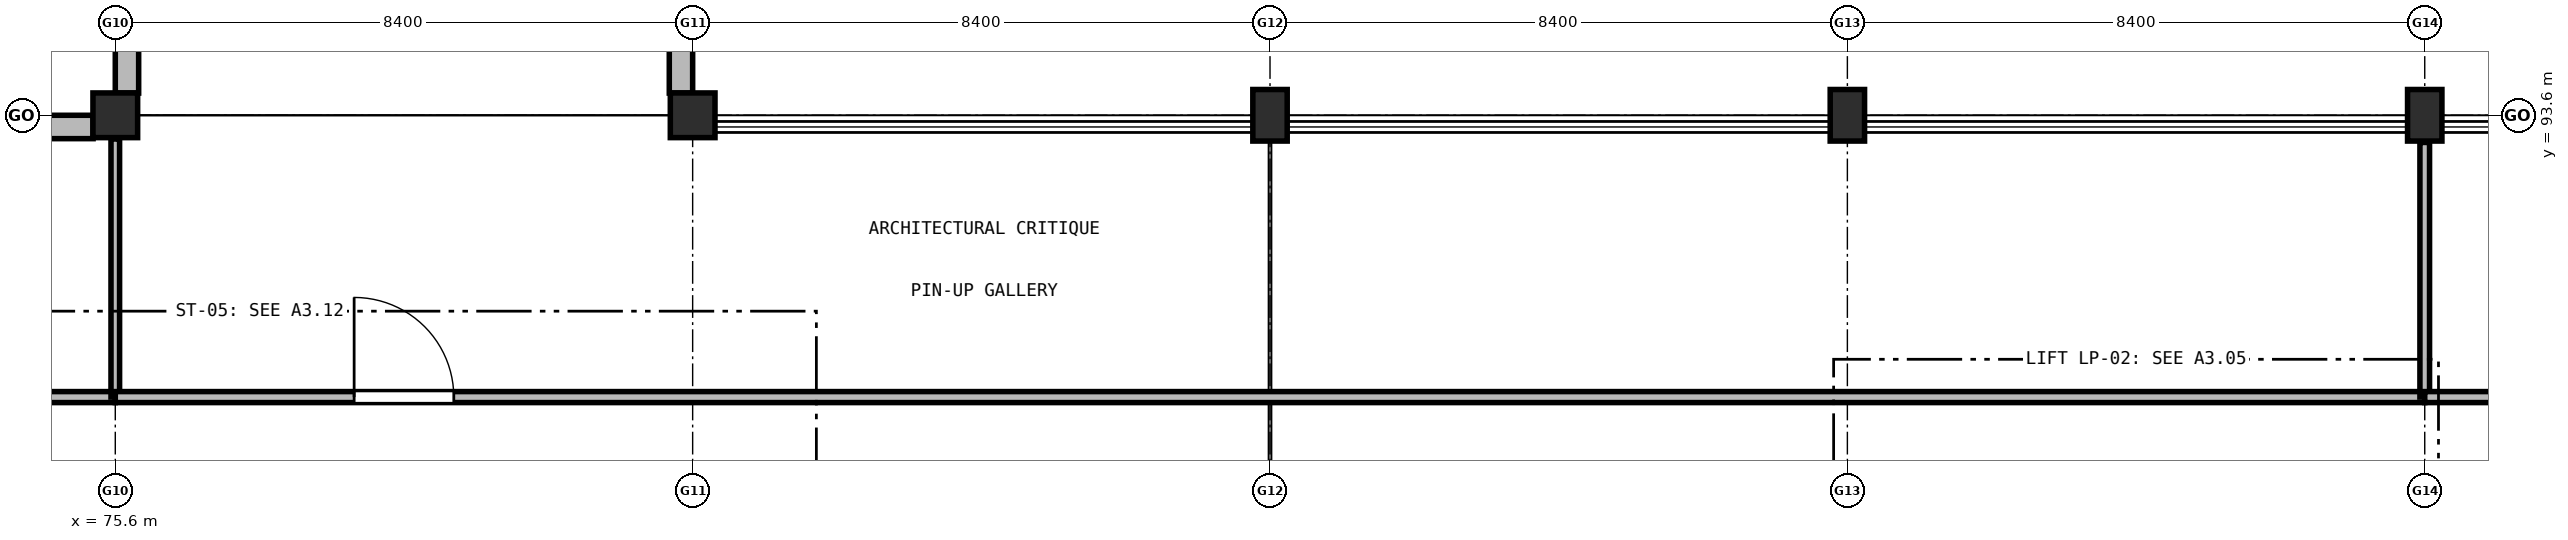
"""IFC4 building model, lengths in metres.
Left out: names, types, materials, properties, quantities, classifications, styles, units other than length and angle.
Written with IfcOpenShell. Run it as: python <this file> out.ifc"""

import sys

from ifc_helpers import new_model, si_unit, direction, frame, frame_2d, origin, origin_2d, place, context, subcontext, project, spatial, rectangle, extrude, element, fill, save


model = new_model("IFC4")
c1 = context("Model", 3, precision=1e-05, world=origin(), true_north=direction((0.0, 1.0)))
c2 = subcontext(c1, "Body", "Model", "MODEL_VIEW")
j1 = project(units=[si_unit("LENGTHUNIT", "METRE"), si_unit("PLANEANGLEUNIT", "RADIAN")], contexts=[c1])
p1 = place(None, origin())
s1 = spatial("IfcSite", under=j1, at=p1, CompositionType="ELEMENT")
p2 = place(p1, origin())
s2 = spatial("IfcBuilding", under=s1, at=p2, CompositionType="ELEMENT")
p3 = place(p2, frame((0.0, 0.0, 5.1)))
s3 = spatial("IfcBuildingStorey", under=s2, at=p3, CompositionType="ELEMENT", Elevation=5.1)
for number, where, z_axis, x_axis in (
    (1, (75.6, 93.6, 0.0), (0.0, 0.0, 1.0), (1.0, 0.0, 0.0)),
    (2, (84.0, 93.6, 0.0), (0.0, 0.0, 1.0), (1.0, 0.0, 0.0)),
):
    element("IfcColumn", number, at=place(p3, frame(where, z_axis=z_axis, x_axis=x_axis)), inside=s3, PredefinedType="COLUMN", context=c2, shape_type="SweptSolid", body=[
        extrude(rectangle(XDim=0.65, YDim=0.65, at=origin_2d()), origin(), (0.0, 0.0, 1.0), 4.2),
    ])
for number, where, z_axis, x_axis in (
    (3, (92.4, 93.6, 0.0), (0.0, 0.0, 1.0), (1.0, 0.0, 0.0)),
    (4, (100.8, 93.6, 0.0), (0.0, 0.0, 1.0), (1.0, 0.0, 0.0)),
    (5, (109.2, 93.6, 0.0), (0.0, 0.0, 1.0), (1.0, 0.0, 0.0)),
):
    element("IfcColumn", number, at=place(p3, frame(where, z_axis=z_axis, x_axis=x_axis)), inside=s3, PredefinedType="COLUMN", context=c2, shape_type="SweptSolid", body=[
        extrude(rectangle(XDim=0.5, YDim=0.75, at=origin_2d()), origin(), (0.0, 0.0, 1.0), 4.2),
    ])
p4 = place(p3, frame((67.523, 93.43, 0.0), z_axis=(0.0, 0.0, 1.0), x_axis=(1.0, 0.0, 0.0)))
e6 = element("IfcWall", 6, at=p4, inside=s3, PredefinedType="SOLIDWALL", context=c2, shape_type="SweptSolid", body=[
    extrude(rectangle(XDim=7.754, YDim=0.34, at=frame_2d((3.877, 0.0))), origin(), (0.0, 0.0, 1.0), 3.11),
])
p5 = place(p4, frame((2.327, 0.0, 0.95)))
e7 = element("IfcOpeningElement", 7, at=p5, cuts=e6, PredefinedType="OPENING", context=c2, shape_type="SweptSolid", body=[
    extrude(rectangle(XDim=3.1, YDim=1.91, at=frame_2d((1.55, 0.955))), frame((0.0, 0.18, 0.0), z_axis=(0.0, -1.0, 0.0), x_axis=(1.0, 0.0, 0.0)), (0.0, 0.0, 1.0), 0.36),
])
p6 = place(p3, frame((75.77, 93.923, 0.0), z_axis=(0.0, 0.0, 1.0), x_axis=(0.0, 1.0, 0.0)))
e8 = element("IfcWall", 8, at=p6, inside=s3, PredefinedType="SOLIDWALL", context=c2, shape_type="SweptSolid", body=[
    extrude(rectangle(XDim=6.504, YDim=0.34, at=frame_2d((3.252, 0.0))), origin(), (0.0, 0.0, 1.0), 3.86),
])
p7 = place(p6, frame((1.602, 0.0, 0.95)))
e9 = element("IfcOpeningElement", 9, at=p7, cuts=e8, PredefinedType="OPENING", context=c2, shape_type="SweptSolid", body=[
    extrude(rectangle(XDim=3.3, YDim=1.65, at=frame_2d((1.65, 0.825))), frame((0.0, 0.18, 0.0), z_axis=(0.0, -1.0, 0.0), x_axis=(1.0, 0.0, 0.0)), (0.0, 0.0, 1.0), 0.36),
])
p8 = place(p3, frame((83.83, 100.427, 0.0), z_axis=(0.0, 0.0, 1.0), x_axis=(0.0, -1.0, 0.0)))
e10 = element("IfcWall", 10, at=p8, inside=s3, PredefinedType="SOLIDWALL", context=c2, shape_type="SweptSolid", body=[
    extrude(rectangle(XDim=6.504, YDim=0.34, at=frame_2d((3.252, 0.0))), origin(), (0.0, 0.0, 1.0), 3.86),
])
p9 = place(p8, frame((2.402, 0.0, 0.95)))
e11 = element("IfcOpeningElement", 11, at=p9, cuts=e10, PredefinedType="OPENING", context=c2, shape_type="SweptSolid", body=[
    extrude(rectangle(XDim=1.7, YDim=1.65, at=frame_2d((0.85, 0.825))), frame((0.0, 0.18, 0.0), z_axis=(0.0, -1.0, 0.0), x_axis=(1.0, 0.0, 0.0)), (0.0, 0.0, 1.0), 0.36),
])
p10 = place(p3, frame((42.0, 89.5, 0.0), z_axis=(0.0, 0.0, 1.0), x_axis=(1.0, 0.0, 0.0)))
e12 = element("IfcWall", 12, at=p10, inside=s3, PredefinedType="PARTITIONING", context=c2, shape_type="SweptSolid", body=[
    extrude(rectangle(XDim=33.6, YDim=0.16, at=frame_2d((16.8, 0.0))), origin(), (0.0, 0.0, 1.0), 3.305),
])
p11 = place(p10, frame((3.7, 0.0, 0.0)))
e13 = element("IfcOpeningElement", 13, at=p11, cuts=e12, PredefinedType="OPENING", context=c2, shape_type="SweptSolid", body=[
    extrude(rectangle(XDim=1.0, YDim=2.1, at=frame_2d((0.5, 1.05))), frame((0.0, 0.09, 0.0), z_axis=(0.0, -1.0, 0.0), x_axis=(1.0, 0.0, 0.0)), (0.0, 0.0, 1.0), 0.18),
])
p12 = place(p3, frame((75.6, 89.5, 0.0), z_axis=(0.0, 0.0, 1.0), x_axis=(0.0, 1.0, 0.0)))
e14 = element("IfcWall", 14, at=p12, inside=s3, PredefinedType="PARTITIONING", context=c2, shape_type="SweptSolid", body=[
    extrude(rectangle(XDim=3.755, YDim=0.125, at=frame_2d((1.877, 0.0))), origin(), (0.0, 0.0, 1.0), 3.105),
])
p13 = place(p3, frame((75.6, 89.5, 0.0), z_axis=(0.0, 0.0, 1.0), x_axis=(1.0, 0.0, 0.0)))
e15 = element("IfcWall", 15, at=p13, inside=s3, PredefinedType="PARTITIONING", context=c2, shape_type="SweptSolid", body=[
    extrude(rectangle(XDim=33.6, YDim=0.16, at=frame_2d((16.8, 0.0))), origin(), (0.0, 0.0, 1.0), 3.305),
])
p14 = place(p13, frame((3.475, 0.0, 0.0)))
e16 = element("IfcOpeningElement", 16, at=p14, cuts=e15, PredefinedType="OPENING", context=c2, shape_type="SweptSolid", body=[
    extrude(rectangle(XDim=1.45, YDim=2.2, at=frame_2d((0.725, 1.1))), frame((0.0, 0.09, 0.0), z_axis=(0.0, -1.0, 0.0), x_axis=(1.0, 0.0, 0.0)), (0.0, 0.0, 1.0), 0.18),
])
p15 = place(p3, frame((109.2, 89.5, 0.0), z_axis=(0.0, 0.0, 1.0), x_axis=(0.0, 1.0, 0.0)))
e17 = element("IfcWall", 17, at=p15, inside=s3, PredefinedType="PARTITIONING", context=c2, shape_type="SweptSolid", body=[
    extrude(rectangle(XDim=3.705, YDim=0.14, at=frame_2d((1.853, 0.0))), origin(), (0.0, 0.0, 1.0), 3.105),
])
p16 = place(p3, frame((109.2, 89.5, 0.0), z_axis=(0.0, 0.0, 1.0), x_axis=(1.0, 0.0, 0.0)))
e18 = element("IfcWall", 18, at=p16, inside=s3, PredefinedType="PARTITIONING", context=c2, shape_type="SweptSolid", body=[
    extrude(rectangle(XDim=24.98, YDim=0.16, at=frame_2d((12.49, 0.0))), origin(), (0.0, 0.0, 1.0), 3.305),
])
p17 = place(p16, frame((3.425, 0.0, 0.0)))
e19 = element("IfcOpeningElement", 19, at=p17, cuts=e18, PredefinedType="OPENING", context=c2, shape_type="SweptSolid", body=[
    extrude(rectangle(XDim=1.55, YDim=2.2, at=frame_2d((0.775, 1.1))), frame((0.0, 0.09, 0.0), z_axis=(0.0, -1.0, 0.0), x_axis=(1.0, 0.0, 0.0)), (0.0, 0.0, 1.0), 0.18),
])
p18 = place(p14, origin())
e20 = element("IfcDoor", 20, at=p18, inside=s3, OperationType="SINGLE_SWING_LEFT", PredefinedType="DOOR", context=c2, shape_type="SweptSolid", body=[
    extrude(rectangle(XDim=1.45, YDim=2.2, at=frame_2d((0.725, 1.1))), frame((0.0, 0.025, 0.0), z_axis=(0.0, -1.0, 0.0), x_axis=(1.0, 0.0, 0.0)), (0.0, 0.0, 1.0), 0.05),
])
fill(e16, e20)
save(model, sys.argv[1])
